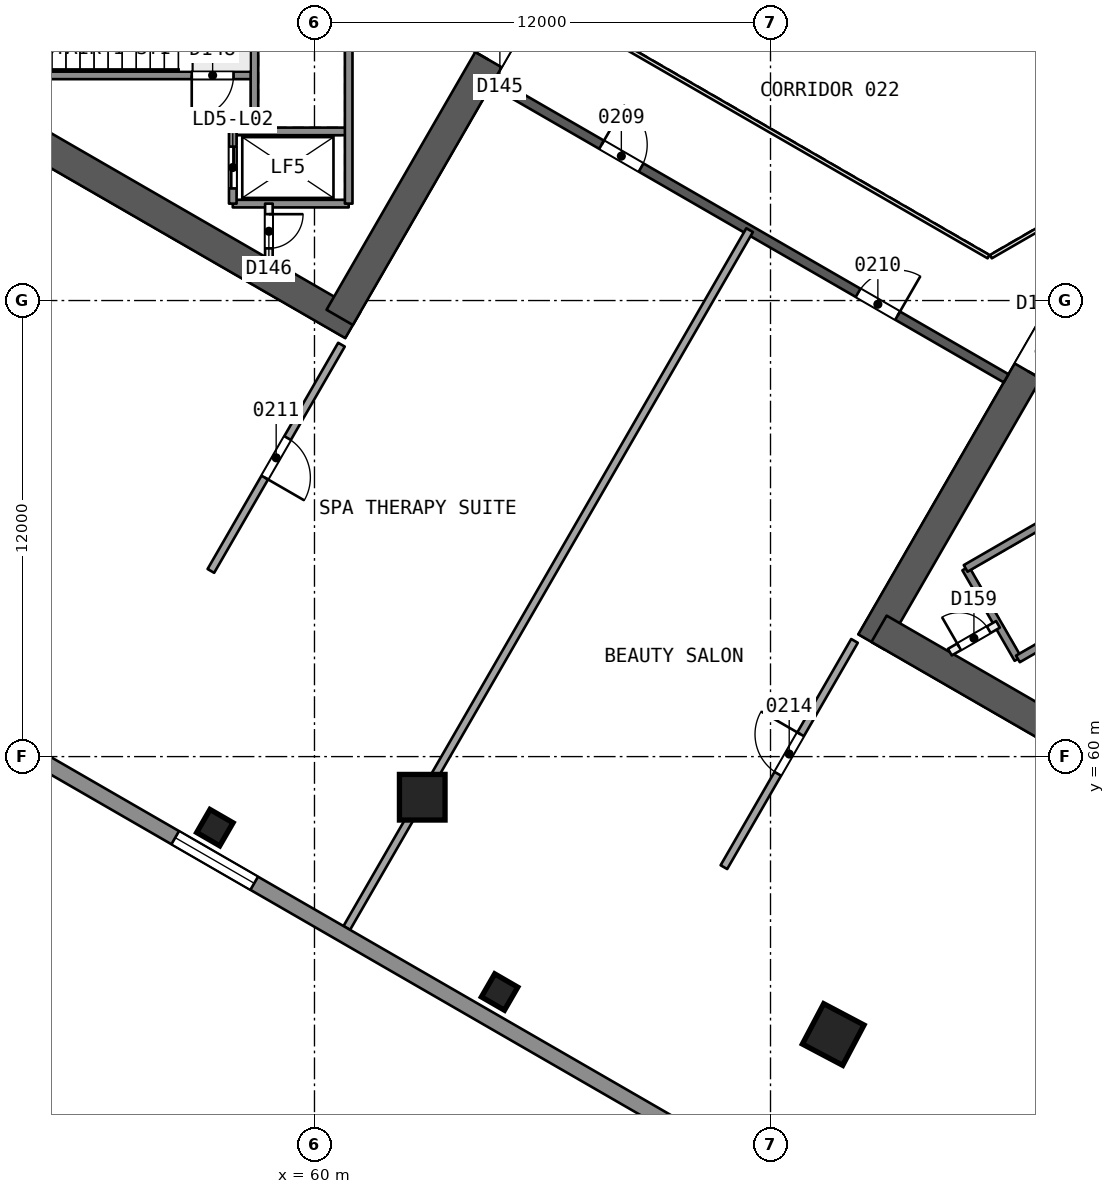
"""IFC4 building model, lengths in metres.
Left out: names, types, materials, properties, quantities, classifications, styles, units other than length and angle.
Written with IfcOpenShell. Run it as: python <this file> out.ifc"""

import sys

from ifc_helpers import new_model, si_unit, direction, frame, frame_2d, origin, origin_2d, place, context, subcontext, project, spatial, rectangle, extrude, element, fill, save


model = new_model("IFC4")
c1 = context("Model", 3, precision=1e-05, world=origin(), true_north=direction((0.0, 1.0)))
c2 = subcontext(c1, "Body", "Model", "MODEL_VIEW")
j1 = project(units=[si_unit("LENGTHUNIT", "METRE"), si_unit("PLANEANGLEUNIT", "RADIAN")], contexts=[c1])
p1 = place(None, origin())
s1 = spatial("IfcSite", under=j1, at=p1, CompositionType="ELEMENT")
p2 = place(p1, origin())
s2 = spatial("IfcBuilding", under=s1, at=p2, CompositionType="ELEMENT")
p3 = place(p2, frame((0.0, 0.0, 15.0)))
s3 = spatial("IfcBuildingStorey", under=s2, at=p3, CompositionType="ELEMENT", Elevation=15.0)
p4 = place(p3, frame((48.797, 78.408, 0.0), z_axis=(0.0, 0.0, 1.0), x_axis=(0.866032504327, -0.499987701298, 0.0)))
e1 = element("IfcWall", 1, at=p4, inside=s3, PredefinedType="SHEAR", context=c2, shape_type="SweptSolid", body=[
    extrude(rectangle(XDim=14.102, YDim=0.8, at=frame_2d((7.051, 0.0))), origin(), (0.0, 0.0, 1.0), 5.4),
])
p5 = place(p3, frame((60.664, 71.557, 0.0), z_axis=(0.0, 0.0, 1.0), x_axis=(0.50000409368, 0.866023040284, 0.0)))
e2 = element("IfcWall", 2, at=p5, inside=s3, PredefinedType="SHEAR", context=c2, shape_type="SweptSolid", body=[
    extrude(rectangle(XDim=9.98, YDim=0.8, at=frame_2d((4.99, 0.0))), origin(), (0.0, 0.0, 1.0), 5.4),
])
p6 = place(p5, frame((7.83, 0.0, 0.0)))
e3 = element("IfcOpeningElement", 3, at=p6, cuts=e2, PredefinedType="OPENING", context=c2, shape_type="SweptSolid", body=[
    extrude(rectangle(XDim=1.2, YDim=2.1, at=frame_2d((0.6, 1.05))), frame((0.0, 0.411, 0.0), z_axis=(0.0, -1.0, 0.0), x_axis=(1.0, 0.0, 0.0)), (0.0, 0.0, 1.0), 0.821),
])
p7 = place(p3, frame((79.731, 71.806, 0.0), z_axis=(0.0, 0.0, 1.0), x_axis=(-0.49999662545, -0.866027352073, 0.0)))
e4 = element("IfcWall", 4, at=p7, inside=s3, PredefinedType="SHEAR", context=c2, shape_type="SweptSolid", body=[
    extrude(rectangle(XDim=10.149, YDim=0.8, at=frame_2d((5.074, 0.0))), origin(), (0.0, 0.0, 1.0), 5.4),
])
p8 = place(p7, frame((0.719, 0.0, 0.0)))
e5 = element("IfcOpeningElement", 5, at=p8, cuts=e4, PredefinedType="OPENING", context=c2, shape_type="SweptSolid", body=[
    extrude(rectangle(XDim=1.2, YDim=2.1, at=frame_2d((0.6, 1.05))), frame((0.0, 0.411, 0.0), z_axis=(0.0, -1.0, 0.0), x_axis=(1.0, 0.0, 0.0)), (0.0, 0.0, 1.0), 0.821),
])
p9 = place(p3, frame((74.856, 63.363, 0.0), z_axis=(0.0, 0.0, 1.0), x_axis=(0.866029478545, -0.499992942241, 0.0)))
e6 = element("IfcWall", 6, at=p9, inside=s3, PredefinedType="SHEAR", context=c2, shape_type="SweptSolid", body=[
    extrude(rectangle(XDim=13.933, YDim=0.8, at=frame_2d((6.967, 0.0))), origin(), (0.0, 0.0, 1.0), 5.4),
])
p10 = place(p3, frame((64.7, 77.748, 0.0), z_axis=(0.0, 0.0, 1.0), x_axis=(0.866026492143, -0.499998114903, 0.0)))
e7 = element("IfcWall", 7, at=p10, inside=s3, PredefinedType="SHEAR", context=c2, shape_type="SweptSolid", body=[
    extrude(rectangle(XDim=15.588, YDim=0.25, at=frame_2d((7.794, 0.0))), origin(), (0.0, 0.0, 1.0), 5.0),
])
p11 = place(p10, frame((3.297, 0.0, 0.0)))
e8 = element("IfcOpeningElement", 8, at=p11, cuts=e7, PredefinedType="OPENING", context=c2, shape_type="SweptSolid", body=[
    extrude(rectangle(XDim=1.2, YDim=2.4, at=frame_2d((0.6, 1.2))), frame((0.0, 0.135, 0.0), z_axis=(0.0, -1.0, 0.0), x_axis=(1.0, 0.0, 0.0)), (0.0, 0.0, 1.0), 0.271),
])
p12 = place(p10, frame((11.091, 0.0, 0.0)))
e9 = element("IfcOpeningElement", 9, at=p12, cuts=e7, PredefinedType="OPENING", context=c2, shape_type="SweptSolid", body=[
    extrude(rectangle(XDim=1.2, YDim=2.4, at=frame_2d((0.6, 1.2))), frame((0.0, 0.135, 0.0), z_axis=(0.0, -1.0, 0.0), x_axis=(1.0, 0.0, 0.0)), (0.0, 0.0, 1.0), 0.271),
])
p13 = place(p3, frame((62.823, 58.91, 0.0), z_axis=(0.010125436974, 0.017448297643, 0.999796495511), x_axis=(-0.864914679348, 0.501918915212, 8.45e-09)))
e10 = element("IfcColumn", 10, at=p13, inside=s3, PredefinedType="COLUMN", context=c2, shape_type="SweptSolid", body=[
    extrude(rectangle(XDim=1.2, YDim=1.2, at=origin_2d()), origin(), (0.0, 0.0, 1.0), 5.401),
])
p14 = place(p3, frame((73.649, 52.66, 0.0), z_axis=(0.000858805594, 0.02278094838, 0.999740111651), x_axis=(-0.5000462336, -0.865764075891, 0.020157607952)))
e11 = element("IfcColumn", 11, at=p14, inside=s3, PredefinedType="COLUMN", context=c2, shape_type="SweptSolid", body=[
    extrude(rectangle(XDim=1.2, YDim=1.2, at=origin_2d()), origin(), (0.0, 0.0, 1.0), 5.401),
])
for number, where, z_axis, x_axis in (
    (12, (57.379, 58.131, 0.0), (0.0, 0.0, 1.0), (0.5, 0.866, 0.0)),
    (13, (64.871, 53.805, 0.0), (0.0, 0.0, 1.0), (0.5, 0.866, 0.0)),
):
    element("IfcColumn", number, at=place(p3, frame(where, z_axis=z_axis, x_axis=x_axis)), inside=s3, PredefinedType="COLUMN", context=c2, shape_type="SweptSolid", body=[
        extrude(rectangle(XDim=0.7, YDim=0.7, at=origin_2d()), origin(), (0.0, 0.0, 1.0), 5.4),
    ])
p15 = place(p3, frame((60.85, 55.491, 0.0), z_axis=(0.0, 0.0, 1.0), x_axis=(0.499994584841, 0.866028530205, 0.0)))
e14 = element("IfcWall", 14, at=p15, inside=s3, PredefinedType="PARTITIONING", context=c2, shape_type="SweptSolid", body=[
    extrude(rectangle(XDim=21.201, YDim=0.2, at=frame_2d((10.601, 0.0))), origin(), (0.0, 0.0, 1.0), 5.0),
])
p16 = place(p3, frame((60.71, 70.838, 0.0), z_axis=(0.0, 0.0, 1.0), x_axis=(-0.499985838573, -0.866033579734, 0.0)))
e15 = element("IfcWall", 15, at=p16, inside=s3, PredefinedType="PARTITIONING", context=c2, shape_type="SweptSolid", body=[
    extrude(rectangle(XDim=6.874, YDim=0.2, at=frame_2d((3.437, 0.0))), origin(), (0.0, 0.0, 1.0), 5.0),
])
p17 = place(p16, frame((2.837, 0.0, 0.0)))
e16 = element("IfcOpeningElement", 16, at=p17, cuts=e15, PredefinedType="OPENING", context=c2, shape_type="SweptSolid", body=[
    extrude(rectangle(XDim=1.2, YDim=2.4, at=frame_2d((0.6, 1.2))), frame((0.0, 0.11, 0.0), z_axis=(0.0, -1.0, 0.0), x_axis=(1.0, 0.0, 0.0)), (0.0, 0.0, 1.0), 0.221),
])
p18 = place(p3, frame((70.774, 57.091, 0.0), z_axis=(0.0, 0.0, 1.0), x_axis=(0.499970459544, 0.866042458303, 0.0)))
e17 = element("IfcWall", 17, at=p18, inside=s3, PredefinedType="PARTITIONING", context=c2, shape_type="SweptSolid", body=[
    extrude(rectangle(XDim=6.874, YDim=0.2, at=frame_2d((3.437, 0.0))), origin(), (0.0, 0.0, 1.0), 5.0),
])
p19 = place(p18, frame((2.837, 0.0, 0.0)))
e18 = element("IfcOpeningElement", 18, at=p19, cuts=e17, PredefinedType="OPENING", context=c2, shape_type="SweptSolid", body=[
    extrude(rectangle(XDim=1.2, YDim=2.4, at=frame_2d((0.6, 1.2))), frame((0.0, 0.11, 0.0), z_axis=(0.0, -1.0, 0.0), x_axis=(1.0, 0.0, 0.0)), (0.0, 0.0, 1.0), 0.221),
])
p20 = place(p3, frame((94.84, 35.636, 0.0), z_axis=(0.0, 0.0, 1.0), x_axis=(-0.866025599265, 0.499999661418, 0.0)))
e19 = element("IfcWall", 19, at=p20, inside=s3, PredefinedType="SOLIDWALL", context=c2, shape_type="SweptSolid", body=[
    extrude(rectangle(XDim=78.727, YDim=0.4, at=frame_2d((39.364, 0.0))), origin(), (0.0, 0.0, 1.0), 5.0),
])
p21 = place(p20, frame((42.061, 0.0, 0.9)))
e20 = element("IfcOpeningElement", 20, at=p21, cuts=e19, PredefinedType="OPENING", context=c2, shape_type="SweptSolid", body=[
    extrude(rectangle(XDim=2.4, YDim=2.4, at=frame_2d((1.2, 1.2))), frame((0.0, 0.21, 0.0), z_axis=(0.0, -1.0, 0.0), x_axis=(1.0, 0.0, 0.0)), (0.0, 0.0, 1.0), 0.421),
])
p22 = place(p3, frame((58.42, 77.925, 0.0), z_axis=(0.0, 0.0, 1.0), x_axis=(-1.0, 0.0, 0.0)))
e21 = element("IfcWall", 21, at=p22, inside=s3, PredefinedType="SOLIDWALL", context=c2, shape_type="SweptSolid", body=[
    extrude(rectangle(XDim=7.7, YDim=0.2, at=frame_2d((3.85, 0.0))), origin(), (0.0, 0.0, 1.0), 5.0),
])
p23 = place(p22, frame((0.55, 0.0, 0.0)))
e22 = element("IfcOpeningElement", 22, at=p23, cuts=e21, PredefinedType="OPENING", context=c2, shape_type="SweptSolid", body=[
    extrude(rectangle(XDim=1.1, YDim=2.1, at=frame_2d((0.55, 1.05))), frame((0.0, 0.11, 0.0), z_axis=(0.0, -1.0, 0.0), x_axis=(1.0, 0.0, 0.0)), (0.0, 0.0, 1.0), 0.221),
])
for number, where, z_axis, x_axis in (
    (23, (60.9, 76.45, 0.0), (0.0, 0.0, 1.0), (-1.0, 0.0, 0.0)),
    (24, (60.9, 74.55, 0.0), (0.0, 0.0, 1.0), (-1.0, 0.0, 0.0)),
):
    element("IfcWall", number, at=place(p3, frame(where, z_axis=z_axis, x_axis=x_axis)), inside=s3, PredefinedType="SOLIDWALL", context=c2, shape_type="SweptSolid", body=[
        extrude(rectangle(XDim=3.05, YDim=0.2, at=frame_2d((1.525, 0.0))), origin(), (0.0, 0.0, 1.0), 5.0),
    ])
p24 = place(p3, frame((60.9, 85.45, 0.0), z_axis=(0.0, 0.0, 1.0), x_axis=(0.0, -1.0, 0.0)))
e25 = element("IfcWall", 25, at=p24, inside=s3, PredefinedType="SOLIDWALL", context=c2, shape_type="SweptSolid", body=[
    extrude(rectangle(XDim=10.9, YDim=0.2, at=frame_2d((5.45, 0.0))), origin(), (0.0, 0.0, 1.0), 5.0),
])
p25 = place(p3, frame((58.8, 74.55, 0.0), z_axis=(0.0, 0.0, 1.0), x_axis=(0.0, -1.0, 0.0)))
e26 = element("IfcWall", 26, at=p25, inside=s3, PredefinedType="PARTITIONING", context=c2, shape_type="SweptSolid", body=[
    extrude(rectangle(XDim=1.455, YDim=0.2, at=frame_2d((0.728, 0.0))), origin(), (0.0, 0.0, 1.0), 5.0),
])
p26 = place(p25, frame((0.278, 0.0, 0.0)))
e27 = element("IfcOpeningElement", 27, at=p26, cuts=e26, PredefinedType="OPENING", context=c2, shape_type="SweptSolid", body=[
    extrude(rectangle(XDim=0.9, YDim=2.1, at=frame_2d((0.45, 1.05))), frame((0.0, 0.11, 0.0), z_axis=(0.0, -1.0, 0.0), x_axis=(1.0, 0.0, 0.0)), (0.0, 0.0, 1.0), 0.221),
])
p27 = place(p3, frame((58.42, 85.45, 0.0), z_axis=(0.0, 0.0, 1.0), x_axis=(0.0, -1.0, 0.0)))
e28 = element("IfcWall", 28, at=p27, inside=s3, PredefinedType="SOLIDWALL", context=c2, shape_type="SweptSolid", body=[
    extrude(rectangle(XDim=9.0, YDim=0.2, at=frame_2d((4.5, 0.0))), origin(), (0.0, 0.0, 1.0), 5.0),
])
p28 = place(p3, frame((57.85, 76.45, 0.0), z_axis=(0.0, 0.0, 1.0), x_axis=(0.0, -1.0, 0.0)))
e29 = element("IfcWall", 29, at=p28, inside=s3, PredefinedType="SOLIDWALL", context=c2, shape_type="SweptSolid", body=[
    extrude(rectangle(XDim=1.9, YDim=0.2, at=frame_2d((0.95, 0.0))), origin(), (0.0, 0.0, 1.0), 5.0),
])
p29 = place(p28, frame((0.4, 0.0, 0.0)))
e30 = element("IfcOpeningElement", 30, at=p29, cuts=e29, PredefinedType="OPENING", context=c2, shape_type="SweptSolid", body=[
    extrude(rectangle(XDim=1.1, YDim=2.1, at=frame_2d((0.55, 1.05))), frame((0.0, 0.11, 0.0), z_axis=(0.0, -1.0, 0.0), x_axis=(1.0, 0.0, 0.0)), (0.0, 0.0, 1.0), 0.221),
])
p30 = place(p3, frame((77.135, 64.952, 0.0), z_axis=(0.0, 0.0, 1.0), x_axis=(0.499996545922, -0.866027397988, 0.0)))
e31 = element("IfcWall", 31, at=p30, inside=s3, PredefinedType="SOLIDWALL", context=c2, shape_type="SweptSolid", body=[
    extrude(rectangle(XDim=2.75, YDim=0.2, at=frame_2d((1.375, 0.0))), origin(), (0.0, 0.0, 1.0), 5.0),
])
p31 = place(p3, frame((77.135, 64.952, 0.0), z_axis=(0.0, 0.0, 1.0), x_axis=(0.866031916153, 0.499988720078, 0.0)))
e32 = element("IfcWall", 32, at=p31, inside=s3, PredefinedType="SOLIDWALL", context=c2, shape_type="SweptSolid", body=[
    extrude(rectangle(XDim=11.35, YDim=0.2, at=frame_2d((5.675, 0.0))), origin(), (0.0, 0.0, 1.0), 5.0),
])
p32 = place(p3, frame((76.72, 62.749, 0.0), z_axis=(0.0, 0.0, 1.0), x_axis=(0.866054810376, 0.49994906283, 0.0)))
e33 = element("IfcWall", 33, at=p32, inside=s3, PredefinedType="PARTITIONING", context=c2, shape_type="SweptSolid", body=[
    extrude(rectangle(XDim=1.461, YDim=0.2, at=frame_2d((0.73, 0.0))), origin(), (0.0, 0.0, 1.0), 5.0),
])
p33 = place(p32, frame((0.281, 0.0, 0.0)))
e34 = element("IfcOpeningElement", 34, at=p33, cuts=e33, PredefinedType="OPENING", context=c2, shape_type="SweptSolid", body=[
    extrude(rectangle(XDim=0.9, YDim=2.1, at=frame_2d((0.45, 1.05))), frame((0.0, 0.11, 0.0), z_axis=(0.0, -1.0, 0.0), x_axis=(1.0, 0.0, 0.0)), (0.0, 0.0, 1.0), 0.221),
])
p34 = place(p3, frame((78.51, 62.57, 0.0), z_axis=(0.0, 0.0, 1.0), x_axis=(0.866053019151, 0.499952165731, 0.0)))
e35 = element("IfcWall", 35, at=p34, inside=s3, PredefinedType="SOLIDWALL", context=c2, shape_type="SweptSolid", body=[
    extrude(rectangle(XDim=2.3, YDim=0.2, at=frame_2d((1.15, 0.0))), origin(), (0.0, 0.0, 1.0), 5.0),
])
p35 = place(p3, frame((67.702, 78.948, 0.0), z_axis=(0.0, 0.0, 1.0), x_axis=(0.866026658274, -0.499997827154, 0.0)))
e36 = element("IfcWall", 36, at=p35, inside=s3, PredefinedType="PARTITIONING", context=c2, shape_type="SweptSolid", body=[
    extrude(rectangle(XDim=11.588, YDim=0.1, at=frame_2d((5.794, 0.0))), origin(), (0.0, 0.0, 1.0), 5.0),
])
p36 = place(p3, frame((77.798, 73.154, 0.0), z_axis=(0.0, 0.0, 1.0), x_axis=(0.866041268327, 0.499972520799, 0.0)))
e37 = element("IfcWall", 37, at=p36, inside=s3, PredefinedType="PARTITIONING", context=c2, shape_type="SweptSolid", body=[
    extrude(rectangle(XDim=2.0, YDim=0.1, at=frame_2d((1.0, 0.0))), origin(), (0.0, 0.0, 1.0), 5.0),
])
p37 = place(p11, origin())
e38 = element("IfcDoor", 38, at=p37, inside=s3, OperationType="SINGLE_SWING_LEFT", PredefinedType="NOTDEFINED", context=c2, shape_type="SweptSolid", body=[
    extrude(rectangle(XDim=1.2, YDim=2.4, at=frame_2d((0.6, 1.2))), frame((0.0, 0.025, 0.0), z_axis=(0.0, -1.0, 0.0), x_axis=(1.0, 0.0, 0.0)), (0.0, 0.0, 1.0), 0.05),
])
fill(e8, e38)
p38 = place(p12, origin())
e39 = element("IfcDoor", 39, at=p38, inside=s3, OperationType="SINGLE_SWING_RIGHT", PredefinedType="NOTDEFINED", context=c2, shape_type="SweptSolid", body=[
    extrude(rectangle(XDim=1.2, YDim=2.4, at=frame_2d((0.6, 1.2))), frame((0.0, 0.025, 0.0), z_axis=(0.0, -1.0, 0.0), x_axis=(1.0, 0.0, 0.0)), (0.0, 0.0, 1.0), 0.05),
])
fill(e9, e39)
p39 = place(p17, origin())
e40 = element("IfcDoor", 40, at=p39, inside=s3, OperationType="SINGLE_SWING_RIGHT", PredefinedType="NOTDEFINED", context=c2, shape_type="SweptSolid", body=[
    extrude(rectangle(XDim=1.2, YDim=2.4, at=frame_2d((0.6, 1.2))), frame((0.0, 0.025, 0.0), z_axis=(0.0, -1.0, 0.0), x_axis=(1.0, 0.0, 0.0)), (0.0, 0.0, 1.0), 0.05),
])
fill(e16, e40)
p40 = place(p19, origin())
e41 = element("IfcDoor", 41, at=p40, inside=s3, OperationType="SINGLE_SWING_RIGHT", PredefinedType="NOTDEFINED", context=c2, shape_type="SweptSolid", body=[
    extrude(rectangle(XDim=1.2, YDim=2.4, at=frame_2d((0.6, 1.2))), frame((0.0, 0.025, 0.0), z_axis=(0.0, -1.0, 0.0), x_axis=(1.0, 0.0, 0.0)), (0.0, 0.0, 1.0), 0.05),
])
fill(e18, e41)
p41 = place(p21, origin())
e42 = element("IfcWindow", 42, at=p41, inside=s3, PartitioningType="SINGLE_PANEL", PredefinedType="WINDOW", context=c2, shape_type="SweptSolid", body=[
    extrude(rectangle(XDim=2.4, YDim=2.4, at=frame_2d((1.2, 1.2))), frame((0.0, 0.03, 0.0), z_axis=(0.0, -1.0, 0.0), x_axis=(1.0, 0.0, 0.0)), (0.0, 0.0, 1.0), 0.06),
])
fill(e20, e42)
p42 = place(p6, origin())
e43 = element("IfcDoor", 43, at=p42, inside=s3, OperationType="SINGLE_SWING_LEFT", PredefinedType="NOTDEFINED", context=c2, shape_type="SweptSolid", body=[
    extrude(rectangle(XDim=1.2, YDim=2.1, at=frame_2d((0.6, 1.05))), frame((0.0, 0.025, 0.0), z_axis=(0.0, -1.0, 0.0), x_axis=(1.0, 0.0, 0.0)), (0.0, 0.0, 1.0), 0.05),
])
fill(e3, e43)
p43 = place(p29, origin())
e44 = element("IfcDoor", 44, at=p43, inside=s3, OperationType="SLIDING_TO_RIGHT", PredefinedType="NOTDEFINED", context=c2, shape_type="SweptSolid", body=[
    extrude(rectangle(XDim=1.1, YDim=2.1, at=frame_2d((0.55, 1.05))), frame((0.0, 0.025, 0.0), z_axis=(0.0, -1.0, 0.0), x_axis=(1.0, 0.0, 0.0)), (0.0, 0.0, 1.0), 0.05),
])
fill(e30, e44)
p44 = place(p26, origin())
e45 = element("IfcDoor", 45, at=p44, inside=s3, OperationType="SINGLE_SWING_LEFT", PredefinedType="NOTDEFINED", context=c2, shape_type="SweptSolid", body=[
    extrude(rectangle(XDim=0.9, YDim=2.1, at=frame_2d((0.45, 1.05))), frame((0.0, 0.025, 0.0), z_axis=(0.0, -1.0, 0.0), x_axis=(1.0, 0.0, 0.0)), (0.0, 0.0, 1.0), 0.05),
])
fill(e27, e45)
p45 = place(p23, origin())
e46 = element("IfcDoor", 46, at=p45, inside=s3, OperationType="SINGLE_SWING_RIGHT", PredefinedType="NOTDEFINED", context=c2, shape_type="SweptSolid", body=[
    extrude(rectangle(XDim=1.1, YDim=2.1, at=frame_2d((0.55, 1.05))), frame((0.0, 0.025, 0.0), z_axis=(0.0, -1.0, 0.0), x_axis=(1.0, 0.0, 0.0)), (0.0, 0.0, 1.0), 0.05),
])
fill(e22, e46)
p46 = place(p8, origin())
e47 = element("IfcDoor", 47, at=p46, inside=s3, OperationType="SINGLE_SWING_RIGHT", PredefinedType="NOTDEFINED", context=c2, shape_type="SweptSolid", body=[
    extrude(rectangle(XDim=1.2, YDim=2.1, at=frame_2d((0.6, 1.05))), frame((0.0, 0.025, 0.0), z_axis=(0.0, -1.0, 0.0), x_axis=(1.0, 0.0, 0.0)), (0.0, 0.0, 1.0), 0.05),
])
fill(e5, e47)
p47 = place(p33, origin())
e48 = element("IfcDoor", 48, at=p47, inside=s3, OperationType="SINGLE_SWING_LEFT", PredefinedType="NOTDEFINED", context=c2, shape_type="SweptSolid", body=[
    extrude(rectangle(XDim=0.9, YDim=2.1, at=frame_2d((0.45, 1.05))), frame((0.0, 0.025, 0.0), z_axis=(0.0, -1.0, 0.0), x_axis=(1.0, 0.0, 0.0)), (0.0, 0.0, 1.0), 0.05),
])
fill(e34, e48)
save(model, sys.argv[1])
